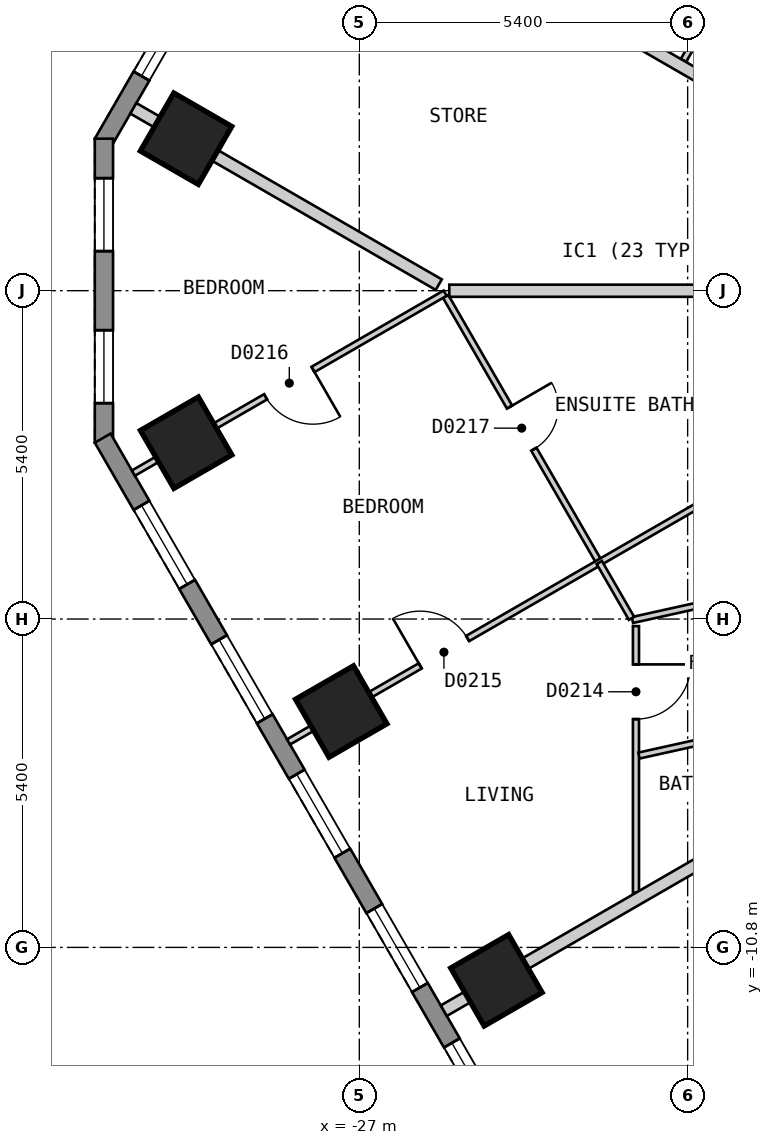
"""IFC4 building model, lengths in metres.
Left out: names, types, materials, properties, quantities, classifications, styles, units other than length and angle.
Written with IfcOpenShell. Run it as: python <this file> out.ifc"""

import sys

from ifc_helpers import new_model, si_unit, direction, frame, frame_2d, origin, origin_2d, place, context, subcontext, project, spatial, polyline, rectangle, outline, extrude, element, fill, save


model = new_model("IFC4")
c1 = context("Model", 3, precision=1e-05, world=origin(), true_north=direction((0.0, 1.0)))
c2 = subcontext(c1, "Body", "Model", "MODEL_VIEW")
j1 = project(units=[si_unit("LENGTHUNIT", "METRE"), si_unit("PLANEANGLEUNIT", "RADIAN")], contexts=[c1])
p1 = place(None, origin())
s1 = spatial("IfcSite", under=j1, at=p1, CompositionType="ELEMENT")
p2 = place(p1, origin())
s2 = spatial("IfcBuilding", under=s1, at=p2, CompositionType="ELEMENT")
p3 = place(p2, frame((0.0, 0.0, 41.4)))
s3 = spatial("IfcBuildingStorey", under=s2, at=p3, CompositionType="ELEMENT", Elevation=41.4)
for number, where, z_axis, x_axis in (
    (1, (-29.849, 2.499, 0.0), (0.0, 0.0, 1.0), (-0.5, -0.866, 0.0)),
    (2, (-29.848, -2.5, 0.0), (0.0, 0.0, 1.0), (0.5, -0.866, 0.0)),
    (3, (-27.297, -6.921, 0.0), (0.0, 0.0, 1.0), (0.5, -0.866, 0.0)),
    (4, (-24.745, -11.341, 0.0), (0.0, 0.0, 1.0), (0.5, -0.866, 0.0)),
):
    element("IfcColumn", number, at=place(p3, frame(where, z_axis=z_axis, x_axis=x_axis)), inside=s3, PredefinedType="COLUMN", context=c2, shape_type="SweptSolid", body=[
        extrude(rectangle(XDim=1.1, YDim=1.1, at=origin_2d()), origin(), (0.0, 0.0, 1.0), 3.0),
    ])
p4 = place(p3, frame((-17.71, 25.825, 0.0), z_axis=(0.0, 0.0, 1.0), x_axis=(-0.500001938803, -0.866024284413, 0.0)))
e5 = element("IfcWall", 5, at=p4, inside=s3, PredefinedType="SOLIDWALL", context=c2, shape_type="SweptSolid", body=[
    extrude(outline(polyline([(0.0, -0.15), (27.02, -0.15), (26.94, 0.15), (0.08, 0.15), (0.0, -0.15)])), origin(), (0.0, 0.0, 1.0), 2.7),
])
p5 = place(p4, frame((1.277, 0.0, 0.15)))
e6 = element("IfcOpeningElement", 6, at=p5, cuts=e5, PredefinedType="OPENING", context=c2, shape_type="SweptSolid", body=[
    extrude(rectangle(XDim=1.5, YDim=2.1, at=frame_2d((0.75, 1.05))), frame((0.0, 0.16, 0.0), z_axis=(0.0, -1.0, 0.0), x_axis=(1.0, 0.0, 0.0)), (0.0, 0.0, 1.0), 0.32),
])
p6 = place(p4, frame((3.829, 0.0, 0.15)))
e7 = element("IfcOpeningElement", 7, at=p6, cuts=e5, PredefinedType="OPENING", context=c2, shape_type="SweptSolid", body=[
    extrude(rectangle(XDim=1.5, YDim=2.1, at=frame_2d((0.75, 1.05))), frame((0.0, 0.16, 0.0), z_axis=(0.0, -1.0, 0.0), x_axis=(1.0, 0.0, 0.0)), (0.0, 0.0, 1.0), 0.32),
])
p7 = place(p4, frame((6.382, 0.0, 0.15)))
e8 = element("IfcOpeningElement", 8, at=p7, cuts=e5, PredefinedType="OPENING", context=c2, shape_type="SweptSolid", body=[
    extrude(rectangle(XDim=1.5, YDim=2.1, at=frame_2d((0.75, 1.05))), frame((0.0, 0.16, 0.0), z_axis=(0.0, -1.0, 0.0), x_axis=(1.0, 0.0, 0.0)), (0.0, 0.0, 1.0), 0.32),
])
p8 = place(p4, frame((8.933, 0.0, 0.15)))
e9 = element("IfcOpeningElement", 9, at=p8, cuts=e5, PredefinedType="OPENING", context=c2, shape_type="SweptSolid", body=[
    extrude(rectangle(XDim=1.5, YDim=2.1, at=frame_2d((0.75, 1.05))), frame((0.0, 0.16, 0.0), z_axis=(0.0, -1.0, 0.0), x_axis=(1.0, 0.0, 0.0)), (0.0, 0.0, 1.0), 0.32),
])
p9 = place(p4, frame((11.485, 0.0, 0.15)))
e10 = element("IfcOpeningElement", 10, at=p9, cuts=e5, PredefinedType="OPENING", context=c2, shape_type="SweptSolid", body=[
    extrude(rectangle(XDim=1.5, YDim=2.1, at=frame_2d((0.75, 1.05))), frame((0.0, 0.16, 0.0), z_axis=(0.0, -1.0, 0.0), x_axis=(1.0, 0.0, 0.0)), (0.0, 0.0, 1.0), 0.32),
])
p10 = place(p4, frame((14.037, 0.0, 0.15)))
e11 = element("IfcOpeningElement", 11, at=p10, cuts=e5, PredefinedType="OPENING", context=c2, shape_type="SweptSolid", body=[
    extrude(rectangle(XDim=1.5, YDim=2.1, at=frame_2d((0.75, 1.05))), frame((0.0, 0.16, 0.0), z_axis=(0.0, -1.0, 0.0), x_axis=(1.0, 0.0, 0.0)), (0.0, 0.0, 1.0), 0.32),
])
p11 = place(p4, frame((16.589, 0.0, 0.15)))
e12 = element("IfcOpeningElement", 12, at=p11, cuts=e5, PredefinedType="OPENING", context=c2, shape_type="SweptSolid", body=[
    extrude(rectangle(XDim=1.5, YDim=2.1, at=frame_2d((0.75, 1.05))), frame((0.0, 0.16, 0.0), z_axis=(0.0, -1.0, 0.0), x_axis=(1.0, 0.0, 0.0)), (0.0, 0.0, 1.0), 0.32),
])
p12 = place(p4, frame((19.141, 0.0, 0.15)))
e13 = element("IfcOpeningElement", 13, at=p12, cuts=e5, PredefinedType="OPENING", context=c2, shape_type="SweptSolid", body=[
    extrude(rectangle(XDim=1.5, YDim=2.1, at=frame_2d((0.75, 1.05))), frame((0.0, 0.16, 0.0), z_axis=(0.0, -1.0, 0.0), x_axis=(1.0, 0.0, 0.0)), (0.0, 0.0, 1.0), 0.32),
])
p13 = place(p4, frame((21.693, 0.0, 0.15)))
e14 = element("IfcOpeningElement", 14, at=p13, cuts=e5, PredefinedType="OPENING", context=c2, shape_type="SweptSolid", body=[
    extrude(rectangle(XDim=1.5, YDim=2.1, at=frame_2d((0.75, 1.05))), frame((0.0, 0.16, 0.0), z_axis=(0.0, -1.0, 0.0), x_axis=(1.0, 0.0, 0.0)), (0.0, 0.0, 1.0), 0.32),
])
p14 = place(p4, frame((24.244, 0.0, 0.15)))
e15 = element("IfcOpeningElement", 15, at=p14, cuts=e5, PredefinedType="OPENING", context=c2, shape_type="SweptSolid", body=[
    extrude(rectangle(XDim=1.5, YDim=2.1, at=frame_2d((0.75, 1.05))), frame((0.0, 0.16, 0.0), z_axis=(0.0, -1.0, 0.0), x_axis=(1.0, 0.0, 0.0)), (0.0, 0.0, 1.0), 0.32),
])
p15 = place(p3, frame((-31.2, 2.5, 0.0), z_axis=(0.0, 0.0, 1.0), x_axis=(0.0, -1.0, 0.0)))
e16 = element("IfcWall", 16, at=p15, inside=s3, PredefinedType="SOLIDWALL", context=c2, shape_type="SweptSolid", body=[
    extrude(outline(polyline([(0.0, -0.15), (5.0, -0.15), (4.92, 0.15), (0.08, 0.15), (0.0, -0.15)])), origin(), (0.0, 0.0, 1.0), 2.7),
])
p16 = place(p15, frame((0.65, 0.0, 0.15)))
e17 = element("IfcOpeningElement", 17, at=p16, cuts=e16, PredefinedType="OPENING", context=c2, shape_type="SweptSolid", body=[
    extrude(rectangle(XDim=1.2, YDim=2.1, at=frame_2d((0.6, 1.05))), frame((0.0, 0.16, 0.0), z_axis=(0.0, -1.0, 0.0), x_axis=(1.0, 0.0, 0.0)), (0.0, 0.0, 1.0), 0.32),
])
p17 = place(p15, frame((3.15, 0.0, 0.15)))
e18 = element("IfcOpeningElement", 18, at=p17, cuts=e16, PredefinedType="OPENING", context=c2, shape_type="SweptSolid", body=[
    extrude(rectangle(XDim=1.2, YDim=2.1, at=frame_2d((0.6, 1.05))), frame((0.0, 0.16, 0.0), z_axis=(0.0, -1.0, 0.0), x_axis=(1.0, 0.0, 0.0)), (0.0, 0.0, 1.0), 0.32),
])
p18 = place(p3, frame((-31.22, -2.425, 0.0), z_axis=(0.0, 0.0, 1.0), x_axis=(0.500001938803, -0.866024284413, 0.0)))
e19 = element("IfcWall", 19, at=p18, inside=s3, PredefinedType="SOLIDWALL", context=c2, shape_type="SweptSolid", body=[
    extrude(outline(polyline([(0.0, -0.15), (27.02, -0.15), (26.94, 0.15), (0.08, 0.15), (0.0, -0.15)])), origin(), (0.0, 0.0, 1.0), 2.7),
])
p19 = place(p18, frame((1.277, 0.0, 0.15)))
e20 = element("IfcOpeningElement", 20, at=p19, cuts=e19, PredefinedType="OPENING", context=c2, shape_type="SweptSolid", body=[
    extrude(rectangle(XDim=1.5, YDim=2.1, at=frame_2d((0.75, 1.05))), frame((0.0, 0.16, 0.0), z_axis=(0.0, -1.0, 0.0), x_axis=(1.0, 0.0, 0.0)), (0.0, 0.0, 1.0), 0.32),
])
p20 = place(p18, frame((3.829, 0.0, 0.15)))
e21 = element("IfcOpeningElement", 21, at=p20, cuts=e19, PredefinedType="OPENING", context=c2, shape_type="SweptSolid", body=[
    extrude(rectangle(XDim=1.5, YDim=2.1, at=frame_2d((0.75, 1.05))), frame((0.0, 0.16, 0.0), z_axis=(0.0, -1.0, 0.0), x_axis=(1.0, 0.0, 0.0)), (0.0, 0.0, 1.0), 0.32),
])
p21 = place(p18, frame((6.382, 0.0, 0.15)))
e22 = element("IfcOpeningElement", 22, at=p21, cuts=e19, PredefinedType="OPENING", context=c2, shape_type="SweptSolid", body=[
    extrude(rectangle(XDim=1.5, YDim=2.1, at=frame_2d((0.75, 1.05))), frame((0.0, 0.16, 0.0), z_axis=(0.0, -1.0, 0.0), x_axis=(1.0, 0.0, 0.0)), (0.0, 0.0, 1.0), 0.32),
])
p22 = place(p18, frame((8.933, 0.0, 0.15)))
e23 = element("IfcOpeningElement", 23, at=p22, cuts=e19, PredefinedType="OPENING", context=c2, shape_type="SweptSolid", body=[
    extrude(rectangle(XDim=1.5, YDim=2.1, at=frame_2d((0.75, 1.05))), frame((0.0, 0.16, 0.0), z_axis=(0.0, -1.0, 0.0), x_axis=(1.0, 0.0, 0.0)), (0.0, 0.0, 1.0), 0.32),
])
p23 = place(p18, frame((11.485, 0.0, 0.15)))
e24 = element("IfcOpeningElement", 24, at=p23, cuts=e19, PredefinedType="OPENING", context=c2, shape_type="SweptSolid", body=[
    extrude(rectangle(XDim=1.5, YDim=2.1, at=frame_2d((0.75, 1.05))), frame((0.0, 0.16, 0.0), z_axis=(0.0, -1.0, 0.0), x_axis=(1.0, 0.0, 0.0)), (0.0, 0.0, 1.0), 0.32),
])
p24 = place(p18, frame((14.037, 0.0, 0.15)))
e25 = element("IfcOpeningElement", 25, at=p24, cuts=e19, PredefinedType="OPENING", context=c2, shape_type="SweptSolid", body=[
    extrude(rectangle(XDim=1.5, YDim=2.1, at=frame_2d((0.75, 1.05))), frame((0.0, 0.16, 0.0), z_axis=(0.0, -1.0, 0.0), x_axis=(1.0, 0.0, 0.0)), (0.0, 0.0, 1.0), 0.32),
])
p25 = place(p18, frame((16.589, 0.0, 0.15)))
e26 = element("IfcOpeningElement", 26, at=p25, cuts=e19, PredefinedType="OPENING", context=c2, shape_type="SweptSolid", body=[
    extrude(rectangle(XDim=1.5, YDim=2.1, at=frame_2d((0.75, 1.05))), frame((0.0, 0.16, 0.0), z_axis=(0.0, -1.0, 0.0), x_axis=(1.0, 0.0, 0.0)), (0.0, 0.0, 1.0), 0.32),
])
p26 = place(p18, frame((19.141, 0.0, 0.15)))
e27 = element("IfcOpeningElement", 27, at=p26, cuts=e19, PredefinedType="OPENING", context=c2, shape_type="SweptSolid", body=[
    extrude(rectangle(XDim=1.5, YDim=2.1, at=frame_2d((0.75, 1.05))), frame((0.0, 0.16, 0.0), z_axis=(0.0, -1.0, 0.0), x_axis=(1.0, 0.0, 0.0)), (0.0, 0.0, 1.0), 0.32),
])
p27 = place(p18, frame((21.693, 0.0, 0.15)))
e28 = element("IfcOpeningElement", 28, at=p27, cuts=e19, PredefinedType="OPENING", context=c2, shape_type="SweptSolid", body=[
    extrude(rectangle(XDim=1.5, YDim=2.1, at=frame_2d((0.75, 1.05))), frame((0.0, 0.16, 0.0), z_axis=(0.0, -1.0, 0.0), x_axis=(1.0, 0.0, 0.0)), (0.0, 0.0, 1.0), 0.32),
])
p28 = place(p18, frame((24.244, 0.0, 0.15)))
e29 = element("IfcOpeningElement", 29, at=p28, cuts=e19, PredefinedType="OPENING", context=c2, shape_type="SweptSolid", body=[
    extrude(rectangle(XDim=1.5, YDim=2.1, at=frame_2d((0.75, 1.05))), frame((0.0, 0.16, 0.0), z_axis=(0.0, -1.0, 0.0), x_axis=(1.0, 0.0, 0.0)), (0.0, 0.0, 1.0), 0.32),
])
p29 = place(p3, frame((-25.58, -0.094, 0.0), z_axis=(0.0, 0.0, 1.0), x_axis=(0.500093258202, -0.865971554441, 0.0)))
e30 = element("IfcWall", 30, at=p29, inside=s3, PredefinedType="PARTITIONING", context=c2, shape_type="SweptSolid", body=[
    extrude(rectangle(XDim=5.053, YDim=0.1, at=frame_2d((2.527, 0.0))), origin(), (0.0, 0.0, 1.0), 2.7),
])
p30 = place(p29, frame((2.102, 0.0, 0.0)))
e31 = element("IfcOpeningElement", 31, at=p30, cuts=e30, PredefinedType="OPENING", context=c2, shape_type="SweptSolid", body=[
    extrude(rectangle(XDim=0.8, YDim=2.1, at=frame_2d((0.4, 1.05))), frame((0.0, 0.06, 0.0), z_axis=(0.0, -1.0, 0.0), x_axis=(1.0, 0.0, 0.0)), (0.0, 0.0, 1.0), 0.12),
])
p31 = place(p3, frame((-21.669, 3.787, 0.0), z_axis=(0.0, 0.0, 1.0), x_axis=(0.499913121084, 0.86607555754, 0.0)))
e32 = element("IfcWall", 32, at=p31, inside=s3, PredefinedType="PARTITIONING", context=c2, shape_type="SweptSolid", body=[
    extrude(rectangle(XDim=3.214, YDim=0.1, at=frame_2d((1.607, 0.0))), origin(), (0.0, 0.0, 1.0), 2.7),
])
p32 = place(p3, frame((-22.45, -9.901, 0.0), z_axis=(0.0, 0.0, 1.0), x_axis=(0.0, 1.0, 0.0)))
e33 = element("IfcWall", 33, at=p32, inside=s3, PredefinedType="PARTITIONING", context=c2, shape_type="SweptSolid", body=[
    extrude(rectangle(XDim=4.385, YDim=0.1, at=frame_2d((2.192, 0.0))), origin(), (0.0, 0.0, 1.0), 2.7),
])
p33 = place(p32, frame((2.855, 0.0, 0.0)))
e34 = element("IfcOpeningElement", 34, at=p33, cuts=e33, PredefinedType="OPENING", context=c2, shape_type="SweptSolid", body=[
    extrude(rectangle(XDim=0.9, YDim=2.1, at=frame_2d((0.45, 1.05))), frame((0.0, 0.06, 0.0), z_axis=(0.0, -1.0, 0.0), x_axis=(1.0, 0.0, 0.0)), (0.0, 0.0, 1.0), 0.12),
])
p34 = place(p3, frame((-22.508, -5.416, 0.0), z_axis=(0.0, 0.0, 1.0), x_axis=(0.976332464286, 0.216275100696, 0.0)))
e35 = element("IfcWall", 35, at=p34, inside=s3, PredefinedType="PARTITIONING", context=c2, shape_type="SweptSolid", body=[
    extrude(rectangle(XDim=4.3, YDim=0.1, at=frame_2d((2.15, 0.0))), origin(), (0.0, 0.0, 1.0), 2.7),
])
p35 = place(p34, frame((1.752, 0.0, 0.0)))
e36 = element("IfcOpeningElement", 36, at=p35, cuts=e35, PredefinedType="OPENING", context=c2, shape_type="SweptSolid", body=[
    extrude(rectangle(XDim=0.9, YDim=2.1, at=frame_2d((0.45, 1.05))), frame((0.0, 0.06, 0.0), z_axis=(0.0, -1.0, 0.0), x_axis=(1.0, 0.0, 0.0)), (0.0, 0.0, 1.0), 0.12),
])
p36 = place(p3, frame((-22.4, -7.645, 0.0), z_axis=(0.0, 0.0, 1.0), x_axis=(0.97634896822, 0.216200583385, 0.0)))
e37 = element("IfcWall", 37, at=p36, inside=s3, PredefinedType="PARTITIONING", context=c2, shape_type="SweptSolid", body=[
    extrude(rectangle(XDim=4.25, YDim=0.1, at=frame_2d((2.125, 0.0))), origin(), (0.0, 0.0, 1.0), 2.7),
])
p37 = place(p36, frame((1.7, 0.0, 0.0)))
e38 = element("IfcOpeningElement", 38, at=p37, cuts=e37, PredefinedType="OPENING", context=c2, shape_type="SweptSolid", body=[
    extrude(rectangle(XDim=0.8, YDim=2.1, at=frame_2d((0.4, 1.05))), frame((0.0, 0.06, 0.0), z_axis=(0.0, -1.0, 0.0), x_axis=(1.0, 0.0, 0.0)), (0.0, 0.0, 1.0), 0.12),
])
p38 = place(p3, frame((-28.163, -7.42, 0.0), z_axis=(0.0, 0.0, 1.0), x_axis=(0.866065245018, 0.499930986609, 0.0)))
e39 = element("IfcWall", 39, at=p38, inside=s3, PredefinedType="PARTITIONING", context=c2, shape_type="SweptSolid", body=[
    extrude(rectangle(XDim=10.0, YDim=0.1, at=frame_2d((5.0, 0.0))), origin(), (0.0, 0.0, 1.0), 2.7),
])
p39 = place(p38, frame((2.5, 0.0, 0.0)))
e40 = element("IfcOpeningElement", 40, at=p39, cuts=e39, PredefinedType="OPENING", context=c2, shape_type="SweptSolid", body=[
    extrude(rectangle(XDim=0.9, YDim=2.1, at=frame_2d((0.45, 1.05))), frame((0.0, 0.06, 0.0), z_axis=(0.0, -1.0, 0.0), x_axis=(1.0, 0.0, 0.0)), (0.0, 0.0, 1.0), 0.12),
])
p40 = place(p3, frame((-30.715, -3.0, 0.0), z_axis=(0.0, 0.0, 1.0), x_axis=(0.866113484451, 0.499847408768, 0.0)))
e41 = element("IfcWall", 41, at=p40, inside=s3, PredefinedType="PARTITIONING", context=c2, shape_type="SweptSolid", body=[
    extrude(rectangle(XDim=5.92, YDim=0.1, at=frame_2d((2.96, 0.0))), origin(), (0.0, 0.0, 1.0), 2.7),
])
p41 = place(p40, frame((2.51, 0.0, 0.0)))
e42 = element("IfcOpeningElement", 42, at=p41, cuts=e41, PredefinedType="OPENING", context=c2, shape_type="SweptSolid", body=[
    extrude(rectangle(XDim=0.9, YDim=2.1, at=frame_2d((0.45, 1.05))), frame((0.0, 0.06, 0.0), z_axis=(0.0, -1.0, 0.0), x_axis=(1.0, 0.0, 0.0)), (0.0, 0.0, 1.0), 0.12),
])
p42 = place(p3, frame((-28.163, 7.419, 0.0), z_axis=(0.0, 0.0, 1.0), x_axis=(0.866022959057, -0.500004234368, 0.0)))
e43 = element("IfcWall", 43, at=p42, inside=s3, PredefinedType="PARTITIONING", context=c2, shape_type="SweptSolid", body=[
    extrude(rectangle(XDim=10.0, YDim=0.2, at=frame_2d((5.0, 0.0))), origin(), (0.0, 0.0, 1.0), 2.7),
])
p43 = place(p3, frame((-30.716, 2.999, 0.0), z_axis=(0.0, 0.0, 1.0), x_axis=(0.866032775405, -0.499987231761, 0.0)))
e44 = element("IfcWall", 44, at=p43, inside=s3, PredefinedType="PARTITIONING", context=c2, shape_type="SweptSolid", body=[
    extrude(rectangle(XDim=5.8, YDim=0.2, at=frame_2d((2.9, 0.0))), origin(), (0.0, 0.0, 1.0), 2.7),
])
p44 = place(p3, frame((-25.52, -0.001, 0.0), z_axis=(0.0, 0.0, 1.0), x_axis=(1.0, 0.0, 0.0)))
e45 = element("IfcWall", 45, at=p44, inside=s3, PredefinedType="PARTITIONING", context=c2, shape_type="SweptSolid", body=[
    extrude(rectangle(XDim=4.736, YDim=0.2, at=frame_2d((2.368, 0.0))), origin(), (0.0, 0.0, 1.0), 2.7),
])
p45 = place(p3, frame((-25.61, -11.841, 0.0), z_axis=(0.0, 0.0, 1.0), x_axis=(0.866019023803, 0.500011050288, 0.0)))
e46 = element("IfcWall", 46, at=p45, inside=s3, PredefinedType="PARTITIONING", context=c2, shape_type="SweptSolid", body=[
    extrude(rectangle(XDim=8.47, YDim=0.2, at=frame_2d((4.235, 0.0))), origin(), (0.0, 0.0, 1.0), 2.7),
])
p46 = place(p3, frame((-23.053, -4.47, 0.0), z_axis=(0.0, 0.0, 1.0), x_axis=(0.499629475903, -0.866239220313, 0.0)))
e47 = element("IfcWall", 47, at=p46, inside=s3, PredefinedType="PARTITIONING", context=c2, shape_type="SweptSolid", body=[
    extrude(rectangle(XDim=1.061, YDim=0.1, at=frame_2d((0.53, 0.0))), origin(), (0.0, 0.0, 1.0), 2.7),
])
p47 = place(p14, origin())
e48 = element("IfcWindow", 48, at=p47, inside=s3, PartitioningType="SINGLE_PANEL", PredefinedType="WINDOW", context=c2, shape_type="SweptSolid", body=[
    extrude(rectangle(XDim=1.5, YDim=2.1, at=frame_2d((0.75, 1.05))), frame((0.0, 0.03, 0.0), z_axis=(0.0, -1.0, 0.0), x_axis=(1.0, 0.0, 0.0)), (0.0, 0.0, 1.0), 0.06),
])
fill(e15, e48)
p48 = place(p16, origin())
e49 = element("IfcWindow", 49, at=p48, inside=s3, PartitioningType="SINGLE_PANEL", PredefinedType="WINDOW", context=c2, shape_type="SweptSolid", body=[
    extrude(rectangle(XDim=1.2, YDim=2.1, at=frame_2d((0.6, 1.05))), frame((0.0, 0.03, 0.0), z_axis=(0.0, -1.0, 0.0), x_axis=(1.0, 0.0, 0.0)), (0.0, 0.0, 1.0), 0.06),
])
fill(e17, e49)
p49 = place(p17, origin())
e50 = element("IfcWindow", 50, at=p49, inside=s3, PartitioningType="SINGLE_PANEL", PredefinedType="WINDOW", context=c2, shape_type="SweptSolid", body=[
    extrude(rectangle(XDim=1.2, YDim=2.1, at=frame_2d((0.6, 1.05))), frame((0.0, 0.03, 0.0), z_axis=(0.0, -1.0, 0.0), x_axis=(1.0, 0.0, 0.0)), (0.0, 0.0, 1.0), 0.06),
])
fill(e18, e50)
p50 = place(p19, origin())
e51 = element("IfcWindow", 51, at=p50, inside=s3, PartitioningType="SINGLE_PANEL", PredefinedType="WINDOW", context=c2, shape_type="SweptSolid", body=[
    extrude(rectangle(XDim=1.5, YDim=2.1, at=frame_2d((0.75, 1.05))), frame((0.0, 0.03, 0.0), z_axis=(0.0, -1.0, 0.0), x_axis=(1.0, 0.0, 0.0)), (0.0, 0.0, 1.0), 0.06),
])
fill(e20, e51)
p51 = place(p20, origin())
e52 = element("IfcWindow", 52, at=p51, inside=s3, PartitioningType="SINGLE_PANEL", PredefinedType="WINDOW", context=c2, shape_type="SweptSolid", body=[
    extrude(rectangle(XDim=1.5, YDim=2.1, at=frame_2d((0.75, 1.05))), frame((0.0, 0.03, 0.0), z_axis=(0.0, -1.0, 0.0), x_axis=(1.0, 0.0, 0.0)), (0.0, 0.0, 1.0), 0.06),
])
fill(e21, e52)
p52 = place(p21, origin())
e53 = element("IfcWindow", 53, at=p52, inside=s3, PartitioningType="SINGLE_PANEL", PredefinedType="WINDOW", context=c2, shape_type="SweptSolid", body=[
    extrude(rectangle(XDim=1.5, YDim=2.1, at=frame_2d((0.75, 1.05))), frame((0.0, 0.03, 0.0), z_axis=(0.0, -1.0, 0.0), x_axis=(1.0, 0.0, 0.0)), (0.0, 0.0, 1.0), 0.06),
])
fill(e22, e53)
p53 = place(p22, origin())
e54 = element("IfcWindow", 54, at=p53, inside=s3, PartitioningType="SINGLE_PANEL", PredefinedType="WINDOW", context=c2, shape_type="SweptSolid", body=[
    extrude(rectangle(XDim=1.5, YDim=2.1, at=frame_2d((0.75, 1.05))), frame((0.0, 0.03, 0.0), z_axis=(0.0, -1.0, 0.0), x_axis=(1.0, 0.0, 0.0)), (0.0, 0.0, 1.0), 0.06),
])
fill(e23, e54)
p54 = place(p23, origin())
e55 = element("IfcWindow", 55, at=p54, inside=s3, PartitioningType="SINGLE_PANEL", PredefinedType="WINDOW", context=c2, shape_type="SweptSolid", body=[
    extrude(rectangle(XDim=1.5, YDim=2.1, at=frame_2d((0.75, 1.05))), frame((0.0, 0.03, 0.0), z_axis=(0.0, -1.0, 0.0), x_axis=(1.0, 0.0, 0.0)), (0.0, 0.0, 1.0), 0.06),
])
fill(e24, e55)
p55 = place(p33, origin())
e56 = element("IfcDoor", 56, at=p55, inside=s3, OperationType="SINGLE_SWING_RIGHT", PredefinedType="DOOR", context=c2, shape_type="SweptSolid", body=[
    extrude(rectangle(XDim=0.9, YDim=2.1, at=frame_2d((0.45, 1.05))), frame((0.0, 0.025, 0.0), z_axis=(0.0, -1.0, 0.0), x_axis=(1.0, 0.0, 0.0)), (0.0, 0.0, 1.0), 0.05),
])
fill(e34, e56)
p56 = place(p39, origin())
e57 = element("IfcDoor", 57, at=p56, inside=s3, OperationType="SINGLE_SWING_LEFT", PredefinedType="DOOR", context=c2, shape_type="SweptSolid", body=[
    extrude(rectangle(XDim=0.9, YDim=2.1, at=frame_2d((0.45, 1.05))), frame((0.0, 0.025, 0.0), z_axis=(0.0, -1.0, 0.0), x_axis=(1.0, 0.0, 0.0)), (0.0, 0.0, 1.0), 0.05),
])
fill(e40, e57)
p57 = place(p41, origin())
e58 = element("IfcDoor", 58, at=p57, inside=s3, OperationType="SINGLE_SWING_RIGHT", PredefinedType="DOOR", context=c2, shape_type="SweptSolid", body=[
    extrude(rectangle(XDim=0.9, YDim=2.1, at=frame_2d((0.45, 1.05))), frame((0.0, 0.025, 0.0), z_axis=(0.0, -1.0, 0.0), x_axis=(1.0, 0.0, 0.0)), (0.0, 0.0, 1.0), 0.05),
])
fill(e42, e58)
p58 = place(p30, origin())
e59 = element("IfcDoor", 59, at=p58, inside=s3, OperationType="SINGLE_SWING_LEFT", PredefinedType="DOOR", context=c2, shape_type="SweptSolid", body=[
    extrude(rectangle(XDim=0.8, YDim=2.1, at=frame_2d((0.4, 1.05))), frame((0.0, 0.025, 0.0), z_axis=(0.0, -1.0, 0.0), x_axis=(1.0, 0.0, 0.0)), (0.0, 0.0, 1.0), 0.05),
])
fill(e31, e59)
save(model, sys.argv[1])
